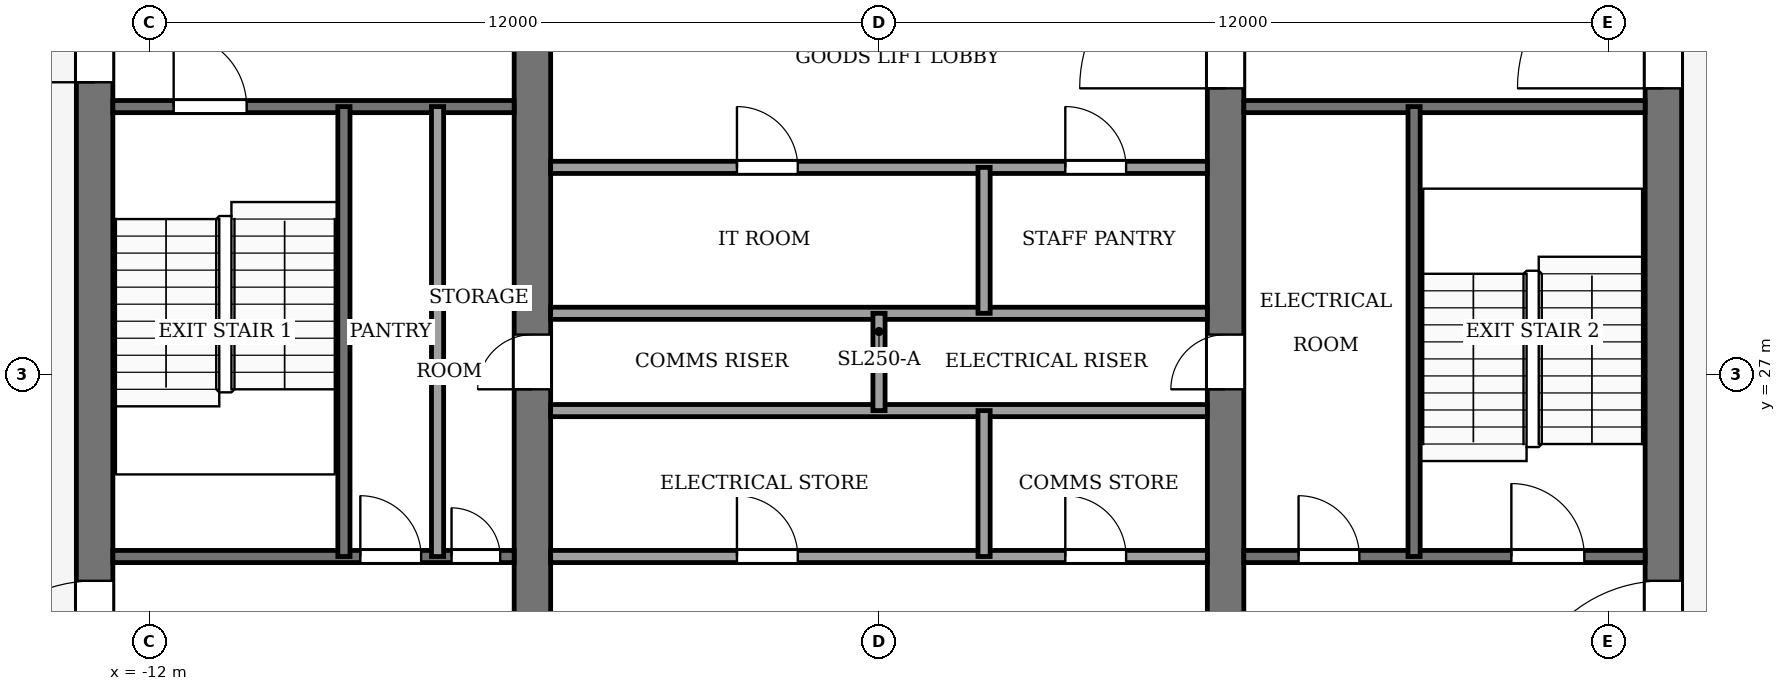
"""IFC4 building model, lengths in metres.
Left out: names, types, materials, properties, quantities, classifications, styles, units other than length and angle.
Written with IfcOpenShell. Run it as: python <this file> out.ifc"""

import sys

from ifc_helpers import new_model, si_unit, direction, frame, frame_2d, origin, place, context, subcontext, project, spatial, rectangle, extrude, element, fill, save


model = new_model("IFC4")
c1 = context("Model", 3, precision=1e-05, world=origin(), true_north=direction((0.0, 1.0)))
c2 = subcontext(c1, "Body", "Model", "MODEL_VIEW")
j1 = project(units=[si_unit("LENGTHUNIT", "METRE"), si_unit("PLANEANGLEUNIT", "RADIAN")], contexts=[c1])
p1 = place(None, origin())
s1 = spatial("IfcSite", under=j1, at=p1, CompositionType="ELEMENT")
p2 = place(p1, origin())
s2 = spatial("IfcBuilding", under=s1, at=p2, CompositionType="ELEMENT")
p3 = place(p2, frame((0.0, 0.0, 330.0)))
s3 = spatial("IfcBuildingStorey", under=s2, at=p3, CompositionType="ELEMENT", Elevation=330.0)
p4 = place(p3, frame((-12.9, 18.4, -0.13), z_axis=(0.0, 0.0, 1.0), x_axis=(0.0, 1.0, 0.0)))
e1 = element("IfcWall", 1, at=p4, inside=s3, PredefinedType="SHEAR", context=c2, shape_type="SweptSolid", body=[
    extrude(rectangle(XDim=19.2, YDim=0.6, at=frame_2d((9.6, 0.0))), origin(), (0.0, 0.0, 1.0), 3.95),
])
p5 = place(p4, frame((2.8, 0.0, 0.13)))
e2 = element("IfcOpeningElement", 2, at=p5, cuts=e1, PredefinedType="OPENING", context=c2, shape_type="SweptSolid", body=[
    extrude(rectangle(XDim=2.4, YDim=2.4, at=frame_2d((1.2, 1.2))), frame((0.0, 0.31, 0.0), z_axis=(0.0, -1.0, 0.0), x_axis=(1.0, 0.0, 0.0)), (0.0, 0.0, 1.0), 0.62),
])
p6 = place(p4, frame((13.4, 0.0, 0.13)))
e3 = element("IfcOpeningElement", 3, at=p6, cuts=e1, PredefinedType="OPENING", context=c2, shape_type="SweptSolid", body=[
    extrude(rectangle(XDim=1.4, YDim=2.2, at=frame_2d((0.7, 1.1))), frame((0.0, 0.31, 0.0), z_axis=(0.0, -1.0, 0.0), x_axis=(1.0, 0.0, 0.0)), (0.0, 0.0, 1.0), 0.62),
])
p7 = place(p3, frame((12.9, 18.4, -0.13), z_axis=(0.0, 0.0, 1.0), x_axis=(0.0, 1.0, 0.0)))
e4 = element("IfcWall", 4, at=p7, inside=s3, PredefinedType="SHEAR", context=c2, shape_type="SweptSolid", body=[
    extrude(rectangle(XDim=19.2, YDim=0.6, at=frame_2d((9.6, 0.0))), origin(), (0.0, 0.0, 1.0), 3.95),
])
p8 = place(p7, frame((2.8, 0.0, 0.13)))
e5 = element("IfcOpeningElement", 5, at=p8, cuts=e4, PredefinedType="OPENING", context=c2, shape_type="SweptSolid", body=[
    extrude(rectangle(XDim=2.4, YDim=2.4, at=frame_2d((1.2, 1.2))), frame((0.0, 0.31, 0.0), z_axis=(0.0, -1.0, 0.0), x_axis=(1.0, 0.0, 0.0)), (0.0, 0.0, 1.0), 0.62),
])
p9 = place(p7, frame((13.3, 0.0, 0.13)))
e6 = element("IfcOpeningElement", 6, at=p9, cuts=e4, PredefinedType="OPENING", context=c2, shape_type="SweptSolid", body=[
    extrude(rectangle(XDim=2.4, YDim=2.4, at=frame_2d((1.2, 1.2))), frame((0.0, 0.31, 0.0), z_axis=(0.0, -1.0, 0.0), x_axis=(1.0, 0.0, 0.0)), (0.0, 0.0, 1.0), 0.62),
])
p10 = place(p3, frame((-5.7, 18.4, -0.13), z_axis=(0.0, 0.0, 1.0), x_axis=(0.0, 1.0, 0.0)))
e7 = element("IfcWall", 7, at=p10, inside=s3, PredefinedType="SHEAR", context=c2, shape_type="SweptSolid", body=[
    extrude(rectangle(XDim=19.2, YDim=0.6, at=frame_2d((9.6, 0.0))), origin(), (0.0, 0.0, 1.0), 3.95),
])
p11 = place(p10, frame((8.35, 0.0, 0.13)))
e8 = element("IfcOpeningElement", 8, at=p11, cuts=e7, PredefinedType="OPENING", context=c2, shape_type="SweptSolid", body=[
    extrude(rectangle(XDim=0.9, YDim=2.1, at=frame_2d((0.45, 1.05))), frame((0.0, 0.31, 0.0), z_axis=(0.0, -1.0, 0.0), x_axis=(1.0, 0.0, 0.0)), (0.0, 0.0, 1.0), 0.62),
])
p12 = place(p3, frame((5.7, 18.4, -0.13), z_axis=(0.0, 0.0, 1.0), x_axis=(0.0, 1.0, 0.0)))
e9 = element("IfcWall", 9, at=p12, inside=s3, PredefinedType="SHEAR", context=c2, shape_type="SweptSolid", body=[
    extrude(rectangle(XDim=19.2, YDim=0.6, at=frame_2d((9.6, 0.0))), origin(), (0.0, 0.0, 1.0), 3.95),
])
p13 = place(p12, frame((8.35, 0.0, 0.13)))
e10 = element("IfcOpeningElement", 10, at=p13, cuts=e9, PredefinedType="OPENING", context=c2, shape_type="SweptSolid", body=[
    extrude(rectangle(XDim=0.9, YDim=2.1, at=frame_2d((0.45, 1.05))), frame((0.0, 0.31, 0.0), z_axis=(0.0, -1.0, 0.0), x_axis=(1.0, 0.0, 0.0)), (0.0, 0.0, 1.0), 0.62),
])
p14 = place(p12, frame((13.3, 0.0, 0.13)))
e11 = element("IfcOpeningElement", 11, at=p14, cuts=e9, PredefinedType="OPENING", context=c2, shape_type="SweptSolid", body=[
    extrude(rectangle(XDim=2.4, YDim=2.4, at=frame_2d((1.2, 1.2))), frame((0.0, 0.31, 0.0), z_axis=(0.0, -1.0, 0.0), x_axis=(1.0, 0.0, 0.0)), (0.0, 0.0, 1.0), 0.62),
])
p15 = place(p3, frame((-12.6, 24.0, 0.0), z_axis=(0.0, 0.0, 1.0), x_axis=(1.0, 0.0, 0.0)))
e12 = element("IfcWall", 12, at=p15, inside=s3, PredefinedType="PARTITIONING", context=c2, shape_type="SweptSolid", body=[
    extrude(rectangle(XDim=6.6, YDim=0.2, at=frame_2d((3.3, 0.0))), origin(), (0.0, 0.0, 1.0), 3.82),
])
p16 = place(p15, frame((4.07, 0.0, 0.0)))
e13 = element("IfcOpeningElement", 13, at=p16, cuts=e12, PredefinedType="OPENING", context=c2, shape_type="SweptSolid", body=[
    extrude(rectangle(XDim=1.0, YDim=2.1, at=frame_2d((0.5, 1.05))), frame((0.0, 0.11, 0.0), z_axis=(0.0, -1.0, 0.0), x_axis=(1.0, 0.0, 0.0)), (0.0, 0.0, 1.0), 0.22),
])
p17 = place(p15, frame((5.57, 0.0, 0.0)))
e14 = element("IfcOpeningElement", 14, at=p17, cuts=e12, PredefinedType="OPENING", context=c2, shape_type="SweptSolid", body=[
    extrude(rectangle(XDim=0.8, YDim=2.1, at=frame_2d((0.4, 1.05))), frame((0.0, 0.11, 0.0), z_axis=(0.0, -1.0, 0.0), x_axis=(1.0, 0.0, 0.0)), (0.0, 0.0, 1.0), 0.22),
])
p18 = place(p3, frame((-5.4, 24.0, 0.0), z_axis=(0.0, 0.0, 1.0), x_axis=(1.0, 0.0, 0.0)))
e15 = element("IfcWall", 15, at=p18, inside=s3, PredefinedType="PARTITIONING", context=c2, shape_type="SweptSolid", body=[
    extrude(rectangle(XDim=10.8, YDim=0.2, at=frame_2d((5.4, 0.0))), origin(), (0.0, 0.0, 1.0), 3.82),
])
p19 = place(p18, frame((3.064, 0.0, 0.0)))
e16 = element("IfcOpeningElement", 16, at=p19, cuts=e15, PredefinedType="OPENING", context=c2, shape_type="SweptSolid", body=[
    extrude(rectangle(XDim=1.0, YDim=2.1, at=frame_2d((0.5, 1.05))), frame((0.0, 0.11, 0.0), z_axis=(0.0, -1.0, 0.0), x_axis=(1.0, 0.0, 0.0)), (0.0, 0.0, 1.0), 0.22),
])
p20 = place(p18, frame((8.464, 0.0, 0.0)))
e17 = element("IfcOpeningElement", 17, at=p20, cuts=e15, PredefinedType="OPENING", context=c2, shape_type="SweptSolid", body=[
    extrude(rectangle(XDim=1.0, YDim=2.1, at=frame_2d((0.5, 1.05))), frame((0.0, 0.11, 0.0), z_axis=(0.0, -1.0, 0.0), x_axis=(1.0, 0.0, 0.0)), (0.0, 0.0, 1.0), 0.22),
])
p21 = place(p3, frame((6.0, 24.0, 0.0), z_axis=(0.0, 0.0, 1.0), x_axis=(1.0, 0.0, 0.0)))
e18 = element("IfcWall", 18, at=p21, inside=s3, PredefinedType="PARTITIONING", context=c2, shape_type="SweptSolid", body=[
    extrude(rectangle(XDim=6.6, YDim=0.2, at=frame_2d((3.3, 0.0))), origin(), (0.0, 0.0, 1.0), 3.82),
])
p22 = place(p21, frame((0.9, 0.0, 0.0)))
e19 = element("IfcOpeningElement", 19, at=p22, cuts=e18, PredefinedType="OPENING", context=c2, shape_type="SweptSolid", body=[
    extrude(rectangle(XDim=1.0, YDim=2.1, at=frame_2d((0.5, 1.05))), frame((0.0, 0.11, 0.0), z_axis=(0.0, -1.0, 0.0), x_axis=(1.0, 0.0, 0.0)), (0.0, 0.0, 1.0), 0.22),
])
p23 = place(p21, frame((4.4, 0.0, 0.0)))
e20 = element("IfcOpeningElement", 20, at=p23, cuts=e18, PredefinedType="OPENING", context=c2, shape_type="SweptSolid", body=[
    extrude(rectangle(XDim=1.2, YDim=2.2, at=frame_2d((0.6, 1.1))), frame((0.0, 0.11, 0.0), z_axis=(0.0, -1.0, 0.0), x_axis=(1.0, 0.0, 0.0)), (0.0, 0.0, 1.0), 0.22),
])
for number, where, z_axis, x_axis in (
    (21, (-5.4, 26.4, 0.0), (0.0, 0.0, 1.0), (1.0, 0.0, 0.0)),
    (22, (-5.4, 28.0, 0.0), (0.0, 0.0, 1.0), (1.0, 0.0, 0.0)),
):
    element("IfcWall", number, at=place(p3, frame(where, z_axis=z_axis, x_axis=x_axis)), inside=s3, PredefinedType="PARTITIONING", context=c2, shape_type="SweptSolid", body=[
        extrude(rectangle(XDim=10.8, YDim=0.2, at=frame_2d((5.4, 0.0))), origin(), (0.0, 0.0, 1.0), 3.82),
    ])
p24 = place(p3, frame((-5.4, 30.4, 0.0), z_axis=(0.0, 0.0, 1.0), x_axis=(1.0, 0.0, 0.0)))
e23 = element("IfcWall", 23, at=p24, inside=s3, PredefinedType="PARTITIONING", context=c2, shape_type="SweptSolid", body=[
    extrude(rectangle(XDim=10.8, YDim=0.2, at=frame_2d((5.4, 0.0))), origin(), (0.0, 0.0, 1.0), 3.82),
])
p25 = place(p24, frame((3.064, 0.0, 0.0)))
e24 = element("IfcOpeningElement", 24, at=p25, cuts=e23, PredefinedType="OPENING", context=c2, shape_type="SweptSolid", body=[
    extrude(rectangle(XDim=1.0, YDim=2.1, at=frame_2d((0.5, 1.05))), frame((0.0, 0.11, 0.0), z_axis=(0.0, -1.0, 0.0), x_axis=(1.0, 0.0, 0.0)), (0.0, 0.0, 1.0), 0.22),
])
p26 = place(p24, frame((8.464, 0.0, 0.0)))
e25 = element("IfcOpeningElement", 25, at=p26, cuts=e23, PredefinedType="OPENING", context=c2, shape_type="SweptSolid", body=[
    extrude(rectangle(XDim=1.0, YDim=2.1, at=frame_2d((0.5, 1.05))), frame((0.0, 0.11, 0.0), z_axis=(0.0, -1.0, 0.0), x_axis=(1.0, 0.0, 0.0)), (0.0, 0.0, 1.0), 0.22),
])
p27 = place(p3, frame((-12.6, 31.4, 0.0), z_axis=(0.0, 0.0, 1.0), x_axis=(1.0, 0.0, 0.0)))
e26 = element("IfcWall", 26, at=p27, inside=s3, PredefinedType="PARTITIONING", context=c2, shape_type="SweptSolid", body=[
    extrude(rectangle(XDim=6.6, YDim=0.2, at=frame_2d((3.3, 0.0))), origin(), (0.0, 0.0, 1.0), 3.82),
])
p28 = place(p27, frame((1.0, 0.0, 0.0)))
e27 = element("IfcOpeningElement", 27, at=p28, cuts=e26, PredefinedType="OPENING", context=c2, shape_type="SweptSolid", body=[
    extrude(rectangle(XDim=1.2, YDim=2.2, at=frame_2d((0.6, 1.1))), frame((0.0, 0.11, 0.0), z_axis=(0.0, -1.0, 0.0), x_axis=(1.0, 0.0, 0.0)), (0.0, 0.0, 1.0), 0.22),
])
p29 = place(p3, frame((6.0, 31.4, 0.0), z_axis=(0.0, 0.0, 1.0), x_axis=(1.0, 0.0, 0.0)))
e28 = element("IfcWall", 28, at=p29, inside=s3, PredefinedType="PARTITIONING", context=c2, shape_type="SweptSolid", body=[
    extrude(rectangle(XDim=6.6, YDim=0.2, at=frame_2d((3.3, 0.0))), origin(), (0.0, 0.0, 1.0), 3.82),
])
for number, where, z_axis, x_axis in (
    (29, (-8.8, 24.0, 0.0), (0.0, 0.0, 1.0), (0.0, 1.0, 0.0)),
    (30, (-7.26, 24.0, 0.0), (0.0, 0.0, 1.0), (0.0, 1.0, 0.0)),
):
    element("IfcWall", number, at=place(p3, frame(where, z_axis=z_axis, x_axis=x_axis)), inside=s3, PredefinedType="PARTITIONING", context=c2, shape_type="SweptSolid", body=[
        extrude(rectangle(XDim=7.4, YDim=0.2, at=frame_2d((3.7, 0.0))), origin(), (0.0, 0.0, 1.0), 3.82),
    ])
p30 = place(p3, frame((0.0, 26.4, 0.0), z_axis=(0.0, 0.0, 1.0), x_axis=(0.0, 1.0, 0.0)))
e31 = element("IfcWall", 31, at=p30, inside=s3, PredefinedType="PARTITIONING", context=c2, shape_type="SweptSolid", body=[
    extrude(rectangle(XDim=1.6, YDim=0.2, at=frame_2d((0.8, 0.0))), origin(), (0.0, 0.0, 1.0), 3.82),
])
for number, where, z_axis, x_axis in (
    (32, (1.728, 24.0, 0.0), (0.0, 0.0, 1.0), (0.0, 1.0, 0.0)),
    (33, (1.728, 28.0, 0.0), (0.0, 0.0, 1.0), (0.0, 1.0, 0.0)),
):
    element("IfcWall", number, at=place(p3, frame(where, z_axis=z_axis, x_axis=x_axis)), inside=s3, PredefinedType="PARTITIONING", context=c2, shape_type="SweptSolid", body=[
        extrude(rectangle(XDim=2.4, YDim=0.2, at=frame_2d((1.2, 0.0))), origin(), (0.0, 0.0, 1.0), 3.82),
    ])
p31 = place(p3, frame((8.8, 24.0, 0.0), z_axis=(0.0, 0.0, 1.0), x_axis=(0.0, 1.0, 0.0)))
e34 = element("IfcWall", 34, at=p31, inside=s3, PredefinedType="PARTITIONING", context=c2, shape_type="SweptSolid", body=[
    extrude(rectangle(XDim=7.4, YDim=0.2, at=frame_2d((3.7, 0.0))), origin(), (0.0, 0.0, 1.0), 3.82),
])
p32 = place(p19, origin())
e35 = element("IfcDoor", 35, at=p32, inside=s3, OperationType="SINGLE_SWING_RIGHT", PredefinedType="DOOR", context=c2, shape_type="SweptSolid", body=[
    extrude(rectangle(XDim=1.0, YDim=2.1, at=frame_2d((0.5, 1.05))), frame((0.0, 0.025, 0.0), z_axis=(0.0, -1.0, 0.0), x_axis=(1.0, 0.0, 0.0)), (0.0, 0.0, 1.0), 0.05),
])
fill(e16, e35)
p33 = place(p20, origin())
e36 = element("IfcDoor", 36, at=p33, inside=s3, OperationType="SINGLE_SWING_LEFT", PredefinedType="DOOR", context=c2, shape_type="SweptSolid", body=[
    extrude(rectangle(XDim=1.0, YDim=2.1, at=frame_2d((0.5, 1.05))), frame((0.0, 0.025, 0.0), z_axis=(0.0, -1.0, 0.0), x_axis=(1.0, 0.0, 0.0)), (0.0, 0.0, 1.0), 0.05),
])
fill(e17, e36)
p34 = place(p25, origin())
e37 = element("IfcDoor", 37, at=p34, inside=s3, OperationType="SINGLE_SWING_RIGHT", PredefinedType="DOOR", context=c2, shape_type="SweptSolid", body=[
    extrude(rectangle(XDim=1.0, YDim=2.1, at=frame_2d((0.5, 1.05))), frame((0.0, 0.025, 0.0), z_axis=(0.0, -1.0, 0.0), x_axis=(1.0, 0.0, 0.0)), (0.0, 0.0, 1.0), 0.05),
])
fill(e24, e37)
p35 = place(p26, origin())
e38 = element("IfcDoor", 38, at=p35, inside=s3, OperationType="SINGLE_SWING_LEFT", PredefinedType="DOOR", context=c2, shape_type="SweptSolid", body=[
    extrude(rectangle(XDim=1.0, YDim=2.1, at=frame_2d((0.5, 1.05))), frame((0.0, 0.025, 0.0), z_axis=(0.0, -1.0, 0.0), x_axis=(1.0, 0.0, 0.0)), (0.0, 0.0, 1.0), 0.05),
])
fill(e25, e38)
p36 = place(p16, origin())
e39 = element("IfcDoor", 39, at=p36, inside=s3, OperationType="SINGLE_SWING_RIGHT", PredefinedType="DOOR", context=c2, shape_type="SweptSolid", body=[
    extrude(rectangle(XDim=1.0, YDim=2.1, at=frame_2d((0.5, 1.05))), frame((0.0, 0.025, 0.0), z_axis=(0.0, -1.0, 0.0), x_axis=(1.0, 0.0, 0.0)), (0.0, 0.0, 1.0), 0.05),
])
fill(e13, e39)
p37 = place(p17, origin())
e40 = element("IfcDoor", 40, at=p37, inside=s3, OperationType="SINGLE_SWING_LEFT", PredefinedType="DOOR", context=c2, shape_type="SweptSolid", body=[
    extrude(rectangle(XDim=0.8, YDim=2.1, at=frame_2d((0.4, 1.05))), frame((0.0, 0.025, 0.0), z_axis=(0.0, -1.0, 0.0), x_axis=(1.0, 0.0, 0.0)), (0.0, 0.0, 1.0), 0.05),
])
fill(e14, e40)
p38 = place(p22, origin())
e41 = element("IfcDoor", 41, at=p38, inside=s3, OperationType="SINGLE_SWING_RIGHT", PredefinedType="DOOR", context=c2, shape_type="SweptSolid", body=[
    extrude(rectangle(XDim=1.0, YDim=2.1, at=frame_2d((0.5, 1.05))), frame((0.0, 0.025, 0.0), z_axis=(0.0, -1.0, 0.0), x_axis=(1.0, 0.0, 0.0)), (0.0, 0.0, 1.0), 0.05),
])
fill(e19, e41)
p39 = place(p11, origin())
e42 = element("IfcDoor", 42, at=p39, inside=s3, OperationType="SINGLE_SWING_LEFT", PredefinedType="DOOR", context=c2, shape_type="SweptSolid", body=[
    extrude(rectangle(XDim=0.9, YDim=2.1, at=frame_2d((0.45, 1.05))), frame((0.0, 0.025, 0.0), z_axis=(0.0, -1.0, 0.0), x_axis=(1.0, 0.0, 0.0)), (0.0, 0.0, 1.0), 0.05),
])
fill(e8, e42)
p40 = place(p13, origin())
e43 = element("IfcDoor", 43, at=p40, inside=s3, OperationType="SINGLE_SWING_RIGHT", PredefinedType="DOOR", context=c2, shape_type="SweptSolid", body=[
    extrude(rectangle(XDim=0.9, YDim=2.1, at=frame_2d((0.45, 1.05))), frame((0.0, 0.025, 0.0), z_axis=(0.0, -1.0, 0.0), x_axis=(1.0, 0.0, 0.0)), (0.0, 0.0, 1.0), 0.05),
])
fill(e10, e43)
p41 = place(p28, origin())
e44 = element("IfcDoor", 44, at=p41, inside=s3, OperationType="SINGLE_SWING_RIGHT", PredefinedType="DOOR", context=c2, shape_type="SweptSolid", body=[
    extrude(rectangle(XDim=1.2, YDim=2.2, at=frame_2d((0.6, 1.1))), frame((0.0, 0.025, 0.0), z_axis=(0.0, -1.0, 0.0), x_axis=(1.0, 0.0, 0.0)), (0.0, 0.0, 1.0), 0.05),
])
fill(e27, e44)
p42 = place(p23, origin())
e45 = element("IfcDoor", 45, at=p42, inside=s3, OperationType="SINGLE_SWING_LEFT", PredefinedType="DOOR", context=c2, shape_type="SweptSolid", body=[
    extrude(rectangle(XDim=1.2, YDim=2.2, at=frame_2d((0.6, 1.1))), frame((0.0, 0.025, 0.0), z_axis=(0.0, -1.0, 0.0), x_axis=(1.0, 0.0, 0.0)), (0.0, 0.0, 1.0), 0.05),
])
fill(e20, e45)
p43 = place(p14, origin())
e46 = element("IfcDoor", 46, at=p43, inside=s3, OperationType="DOUBLE_DOOR_SINGLE_SWING", PredefinedType="DOOR", context=c2, shape_type="SweptSolid", body=[
    extrude(rectangle(XDim=2.4, YDim=2.4, at=frame_2d((1.2, 1.2))), frame((0.0, 0.025, 0.0), z_axis=(0.0, -1.0, 0.0), x_axis=(1.0, 0.0, 0.0)), (0.0, 0.0, 1.0), 0.05),
])
fill(e11, e46)
p44 = place(p5, origin())
e47 = element("IfcDoor", 47, at=p44, inside=s3, OperationType="DOUBLE_DOOR_SINGLE_SWING", PredefinedType="DOOR", context=c2, shape_type="SweptSolid", body=[
    extrude(rectangle(XDim=2.4, YDim=2.4, at=frame_2d((1.2, 1.2))), frame((0.0, 0.025, 0.0), z_axis=(0.0, -1.0, 0.0), x_axis=(1.0, 0.0, 0.0)), (0.0, 0.0, 1.0), 0.05),
])
fill(e2, e47)
p45 = place(p8, origin())
e48 = element("IfcDoor", 48, at=p45, inside=s3, OperationType="DOUBLE_DOOR_SINGLE_SWING", PredefinedType="DOOR", context=c2, shape_type="SweptSolid", body=[
    extrude(rectangle(XDim=2.4, YDim=2.4, at=frame_2d((1.2, 1.2))), frame((0.0, 0.025, 0.0), z_axis=(0.0, -1.0, 0.0), x_axis=(1.0, 0.0, 0.0)), (0.0, 0.0, 1.0), 0.05),
])
fill(e5, e48)
p46 = place(p9, origin())
e49 = element("IfcDoor", 49, at=p46, inside=s3, OperationType="DOUBLE_DOOR_SINGLE_SWING", PredefinedType="DOOR", context=c2, shape_type="SweptSolid", body=[
    extrude(rectangle(XDim=2.4, YDim=2.4, at=frame_2d((1.2, 1.2))), frame((0.0, 0.025, 0.0), z_axis=(0.0, -1.0, 0.0), x_axis=(1.0, 0.0, 0.0)), (0.0, 0.0, 1.0), 0.05),
])
fill(e6, e49)
p47 = place(p6, origin())
e50 = element("IfcDoor", 50, at=p47, inside=s3, OperationType="SINGLE_SWING_RIGHT", PredefinedType="DOOR", context=c2, shape_type="SweptSolid", body=[
    extrude(rectangle(XDim=1.4, YDim=2.2, at=frame_2d((0.7, 1.1))), frame((0.0, 0.025, 0.0), z_axis=(0.0, -1.0, 0.0), x_axis=(1.0, 0.0, 0.0)), (0.0, 0.0, 1.0), 0.05),
])
fill(e3, e50)
save(model, sys.argv[1])
